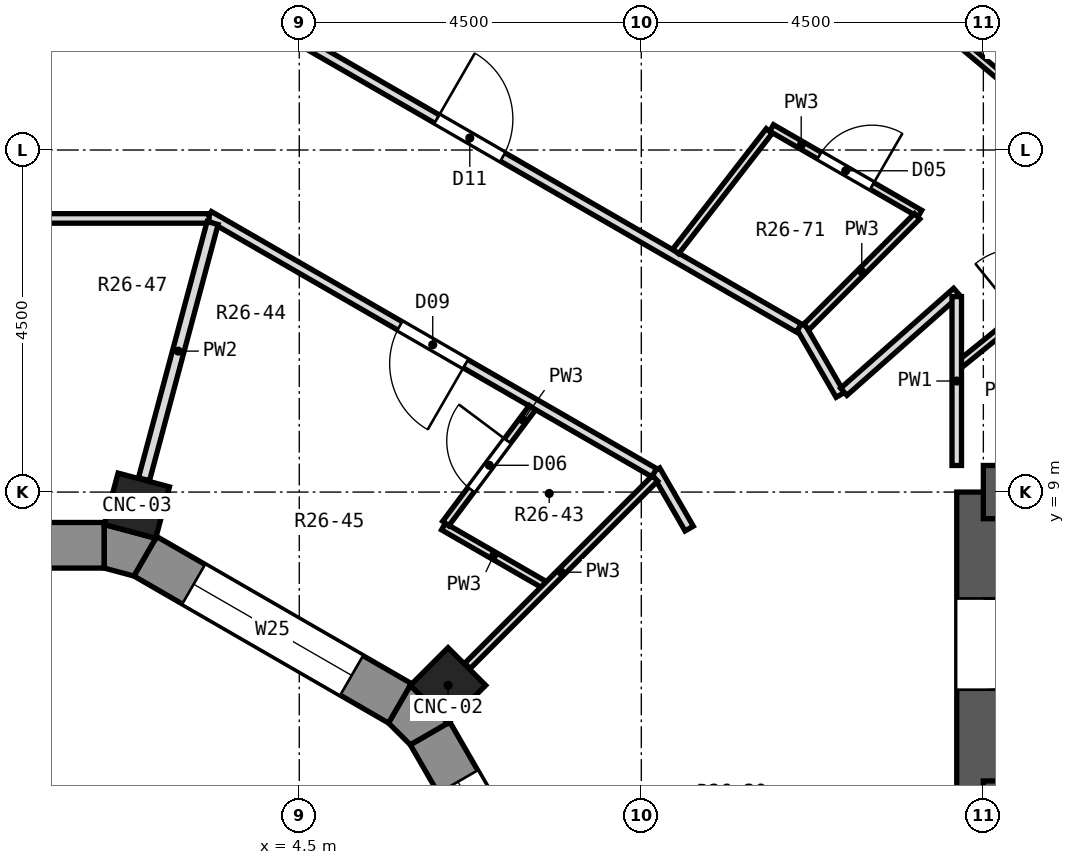
"""IFC4 building model, lengths in metres.
Left out: names, types, materials, properties, quantities, classifications, styles, units other than length and angle.
Written with IfcOpenShell. Run it as: python <this file> out.ifc"""

import sys

from ifc_helpers import new_model, si_unit, direction, frame, frame_2d, origin, origin_2d, place, context, subcontext, project, spatial, polyline, rectangle, outline, extrude, element, fill, save


model = new_model("IFC4")
c1 = context("Model", 3, precision=1e-05, world=origin(), true_north=direction((0.0, 1.0)))
c2 = subcontext(c1, "Body", "Model", "MODEL_VIEW")
j1 = project(units=[si_unit("LENGTHUNIT", "METRE"), si_unit("PLANEANGLEUNIT", "RADIAN")], contexts=[c1])
p1 = place(None, origin())
s1 = spatial("IfcSite", under=j1, at=p1, CompositionType="ELEMENT")
p2 = place(p1, origin())
s2 = spatial("IfcBuilding", under=s1, at=p2, CompositionType="ELEMENT")
p3 = place(p2, frame((0.0, 0.0, 170.7)))
s3 = spatial("IfcBuildingStorey", under=s2, at=p3, CompositionType="ELEMENT", Elevation=170.7)
for number, where, z_axis, x_axis in (
    (1, (6.458, 6.458, 0.0), (0.0, 0.0, 1.0), (0.707, 0.707, 0.0)),
    (2, (2.364, 8.821, 0.0), (0.0, 0.0, 1.0), (0.259, 0.966, 0.0)),
):
    element("IfcColumn", number, at=place(p3, frame(where, z_axis=z_axis, x_axis=x_axis)), inside=s3, PredefinedType="COLUMN", context=c2, shape_type="SweptSolid", body=[
        extrude(rectangle(XDim=0.7, YDim=0.7, at=origin_2d()), origin(), (0.0, 0.0, 1.0), 3.3),
    ])
p4 = place(p3, frame((13.5, -9.0, 0.0), z_axis=(0.0, 0.0, 1.0), x_axis=(0.0, 1.0, 0.0)))
e3 = element("IfcWall", 3, at=p4, inside=s3, PredefinedType="SHEAR", context=c2, shape_type="SweptSolid", body=[
    extrude(rectangle(XDim=18.0, YDim=0.7, at=frame_2d((9.0, 0.0))), origin(), (0.0, 0.0, 1.0), 3.3),
])
p5 = place(p4, frame((15.4, 0.0, 0.0)))
e4 = element("IfcOpeningElement", 4, at=p5, cuts=e3, PredefinedType="OPENING", context=c2, shape_type="SweptSolid", body=[
    extrude(rectangle(XDim=1.2, YDim=2.1, at=frame_2d((0.6, 1.05))), frame((0.0, 0.362, 0.0), z_axis=(0.0, -1.0, 0.0), x_axis=(1.0, 0.0, 0.0)), (0.0, 0.0, 1.0), 0.724),
])
p6 = place(p4, frame((1.4, 0.0, 0.0)))
e5 = element("IfcOpeningElement", 5, at=p6, cuts=e3, PredefinedType="OPENING", context=c2, shape_type="SweptSolid", body=[
    extrude(rectangle(XDim=1.2, YDim=2.1, at=frame_2d((0.6, 1.05))), frame((0.0, 0.362, 0.0), z_axis=(0.0, -1.0, 0.0), x_axis=(1.0, 0.0, 0.0)), (0.0, 0.0, 1.0), 0.724),
])
p7 = place(p4, frame((7.5, 0.0, 0.0)))
e6 = element("IfcOpeningElement", 6, at=p7, cuts=e3, PredefinedType="OPENING", context=c2, shape_type="SweptSolid", body=[
    extrude(rectangle(XDim=3.0, YDim=2.4, at=frame_2d((1.5, 1.2))), frame((0.0, 0.362, 0.0), z_axis=(0.0, -1.0, 0.0), x_axis=(1.0, 0.0, 0.0)), (0.0, 0.0, 1.0), 0.724),
])
p8 = place(p3, frame((13.5, 9.0, 0.0), z_axis=(0.0, 0.0, 1.0), x_axis=(1.0, 0.0, 0.0)))
e7 = element("IfcWall", 7, at=p8, inside=s3, PredefinedType="SHEAR", context=c2, shape_type="SweptSolid", body=[
    extrude(rectangle(XDim=8.0, YDim=0.7, at=frame_2d((4.0, 0.0))), origin(), (0.0, 0.0, 1.0), 3.3),
])
p9 = place(p3, frame((13.5, 5.0, 0.0), z_axis=(0.0, 0.0, 1.0), x_axis=(1.0, 0.0, 0.0)))
e8 = element("IfcWall", 8, at=p9, inside=s3, PredefinedType="SHEAR", context=c2, shape_type="SweptSolid", body=[
    extrude(rectangle(XDim=8.0, YDim=0.4, at=frame_2d((4.0, 0.0))), origin(), (0.0, 0.0, 1.0), 3.3),
])
p10 = place(p9, frame((6.285, 0.0, 0.0)))
e9 = element("IfcOpeningElement", 9, at=p10, cuts=e8, PredefinedType="OPENING", context=c2, shape_type="SweptSolid", body=[
    extrude(rectangle(XDim=0.9, YDim=2.1, at=frame_2d((0.45, 1.05))), frame((0.0, 0.212, 0.0), z_axis=(0.0, -1.0, 0.0), x_axis=(1.0, 0.0, 0.0)), (0.0, 0.0, 1.0), 0.424),
])
p11 = place(p3, frame((8.156, 2.474, 0.0), z_axis=(0.0, 0.0, 1.0), x_axis=(-0.500033728941, 0.866005929495, 0.0)))
e10 = element("IfcWall", 10, at=p11, inside=s3, PredefinedType="SOLIDWALL", context=c2, shape_type="SweptSolid", body=[
    extrude(rectangle(XDim=3.87, YDim=0.6, at=frame_2d((1.935, 0.0))), origin(), (0.0, 0.0, 1.0), 2.85),
])
p12 = place(p11, frame((0.735, 0.0, 0.9)))
e11 = element("IfcOpeningElement", 11, at=p12, cuts=e10, PredefinedType="OPENING", context=c2, shape_type="SweptSolid", body=[
    extrude(rectangle(XDim=2.4, YDim=1.8, at=frame_2d((1.2, 0.9))), frame((0.0, 0.312, 0.0), z_axis=(0.0, -1.0, 0.0), x_axis=(1.0, 0.0, 0.0)), (0.0, 0.0, 1.0), 0.624),
])
p13 = place(p3, frame((5.826, 6.22, 0.0), z_axis=(0.0, 0.0, 1.0), x_axis=(-0.866005929495, 0.500033728941, 0.0)))
e12 = element("IfcWall", 12, at=p13, inside=s3, PredefinedType="SOLIDWALL", context=c2, shape_type="SweptSolid", body=[
    extrude(rectangle(XDim=3.87, YDim=0.6, at=frame_2d((1.935, 0.0))), origin(), (0.0, 0.0, 1.0), 2.85),
])
p14 = place(p13, frame((0.735, 0.0, 0.9)))
e13 = element("IfcOpeningElement", 13, at=p14, cuts=e12, PredefinedType="OPENING", context=c2, shape_type="SweptSolid", body=[
    extrude(rectangle(XDim=2.4, YDim=1.8, at=frame_2d((1.2, 0.9))), frame((0.0, 0.312, 0.0), z_axis=(0.0, -1.0, 0.0), x_axis=(1.0, 0.0, 0.0)), (0.0, 0.0, 1.0), 0.624),
])
p15 = place(p3, frame((1.935, 8.3, 0.0), z_axis=(0.0, 0.0, 1.0), x_axis=(-1.0, 0.0, 0.0)))
e14 = element("IfcWall", 14, at=p15, inside=s3, PredefinedType="SOLIDWALL", context=c2, shape_type="SweptSolid", body=[
    extrude(rectangle(XDim=3.87, YDim=0.6, at=frame_2d((1.935, 0.0))), origin(), (0.0, 0.0, 1.0), 2.85),
])
p16 = place(p15, frame((0.735, 0.0, 0.9)))
e15 = element("IfcOpeningElement", 15, at=p16, cuts=e14, PredefinedType="OPENING", context=c2, shape_type="SweptSolid", body=[
    extrude(rectangle(XDim=2.4, YDim=1.8, at=frame_2d((1.2, 0.9))), frame((0.0, 0.312, 0.0), z_axis=(0.0, -1.0, 0.0), x_axis=(1.0, 0.0, 0.0)), (0.0, 0.0, 1.0), 0.624),
])
p17 = place(p3, origin())
e16 = element("IfcWall", 16, at=p17, inside=s3, PredefinedType="SOLIDWALL", context=c2, shape_type="SweptSolid", body=[
    extrude(outline(polyline([(5.962, 6.458), (5.676, 5.961), (5.961, 5.676), (6.458, 5.962), (5.962, 6.458)])), origin(), (0.0, 0.0, 1.0), 2.85),
])
p18 = place(p3, origin())
e17 = element("IfcWall", 17, at=p18, inside=s3, PredefinedType="SOLIDWALL", context=c2, shape_type="SweptSolid", body=[
    extrude(outline(polyline([(1.935, 8.573), (1.935, 8.0), (2.324, 7.896), (2.611, 8.392), (1.935, 8.573)])), origin(), (0.0, 0.0, 1.0), 2.85),
])
p19 = place(p3, frame((9.188, 9.287, 0.0), z_axis=(0.0, 0.0, 1.0), x_axis=(0.499403939877, -0.866369265865, 0.0)))
e18 = element("IfcWall", 18, at=p19, inside=s3, PredefinedType="PARTITIONING", context=c2, shape_type="SweptSolid", body=[
    extrude(rectangle(XDim=0.885, YDim=0.125, at=frame_2d((0.442, 0.0))), origin(), (0.0, 0.0, 1.0), 2.85),
])
p20 = place(p3, frame((11.091, 11.189, 0.0), z_axis=(0.0, 0.0, 1.0), x_axis=(0.499956751108, -0.866050372104, 0.0)))
e19 = element("IfcWall", 19, at=p20, inside=s3, PredefinedType="PARTITIONING", context=c2, shape_type="SweptSolid", body=[
    extrude(rectangle(XDim=1.052, YDim=0.125, at=frame_2d((0.526, 0.0))), origin(), (0.0, 0.0, 1.0), 2.85),
])
p21 = place(p3, frame((12.401, 15.578, 0.0), z_axis=(0.0, 0.0, 1.0), x_axis=(0.766209231034, -0.642591171958, 0.0)))
e20 = element("IfcWall", 20, at=p21, inside=s3, PredefinedType="PARTITIONING", context=c2, shape_type="SweptSolid", body=[
    extrude(rectangle(XDim=2.192, YDim=0.1, at=frame_2d((1.096, 0.0))), origin(), (0.0, 0.0, 1.0), 2.85),
])
p22 = place(p3, frame((6.397, 8.546, 0.0), z_axis=(0.0, 0.0, 1.0), x_axis=(0.866313615635, -0.499500469836, 0.0)))
e21 = element("IfcWall", 21, at=p22, inside=s3, PredefinedType="PARTITIONING", context=c2, shape_type="SweptSolid", body=[
    extrude(rectangle(XDim=1.523, YDim=0.1, at=frame_2d((0.762, 0.0))), origin(), (0.0, 0.0, 1.0), 2.85),
])
p23 = place(p3, frame((3.313, 12.636, 0.0), z_axis=(0.0, 0.0, 1.0), x_axis=(0.866048512801, -0.499959971872, 0.0)))
e22 = element("IfcWall", 22, at=p23, inside=s3, PredefinedType="PARTITIONING", context=c2, shape_type="SweptSolid", body=[
    extrude(rectangle(XDim=6.762, YDim=0.125, at=frame_2d((3.381, 0.0))), origin(), (0.0, 0.0, 1.0), 2.85),
])
p24 = place(p23, frame((2.898, 0.0, 0.0)))
e23 = element("IfcOpeningElement", 23, at=p24, cuts=e22, PredefinedType="OPENING", context=c2, shape_type="SweptSolid", body=[
    extrude(rectangle(XDim=1.0, YDim=2.1, at=frame_2d((0.5, 1.05))), frame((0.0, 0.074, 0.0), z_axis=(0.0, -1.0, 0.0), x_axis=(1.0, 0.0, 0.0)), (0.0, 0.0, 1.0), 0.149),
])
p25 = place(p3, frame((4.01, 15.236, 0.0), z_axis=(0.0, 0.0, 1.0), x_axis=(0.865999621737, -0.500044653157, 0.0)))
e24 = element("IfcWall", 24, at=p25, inside=s3, PredefinedType="PARTITIONING", context=c2, shape_type="SweptSolid", body=[
    extrude(rectangle(XDim=8.155, YDim=0.125, at=frame_2d((4.078, 0.0))), origin(), (0.0, 0.0, 1.0), 2.85),
])
p26 = place(p25, frame((2.656, 0.0, 0.0)))
e25 = element("IfcOpeningElement", 25, at=p26, cuts=e24, PredefinedType="OPENING", context=c2, shape_type="SweptSolid", body=[
    extrude(rectangle(XDim=1.0, YDim=2.1, at=frame_2d((0.5, 1.05))), frame((0.0, 0.074, 0.0), z_axis=(0.0, -1.0, 0.0), x_axis=(1.0, 0.0, 0.0)), (0.0, 0.0, 1.0), 0.149),
])
p27 = place(p3, frame((10.714, 13.79, 0.0), z_axis=(0.0, 0.0, 1.0), x_axis=(0.865992377614, -0.500057198642, 0.0)))
e26 = element("IfcWall", 26, at=p27, inside=s3, PredefinedType="PARTITIONING", context=c2, shape_type="SweptSolid", body=[
    extrude(rectangle(XDim=2.252, YDim=0.1, at=frame_2d((1.126, 0.0))), origin(), (0.0, 0.0, 1.0), 2.85),
])
p28 = place(p27, frame((0.726, 0.0, 0.0)))
e27 = element("IfcOpeningElement", 27, at=p28, cuts=e26, PredefinedType="OPENING", context=c2, shape_type="SweptSolid", body=[
    extrude(rectangle(XDim=0.8, YDim=2.1, at=frame_2d((0.4, 1.05))), frame((0.0, 0.062, 0.0), z_axis=(0.0, -1.0, 0.0), x_axis=(1.0, 0.0, 0.0)), (0.0, 0.0, 1.0), 0.124),
])
p29 = place(p3, frame((-3.463, 12.6, 0.0), z_axis=(0.0, 0.0, 1.0), x_axis=(1.0, 0.0, 0.0)))
e28 = element("IfcWall", 28, at=p29, inside=s3, PredefinedType="PARTITIONING", context=c2, shape_type="SweptSolid", body=[
    extrude(rectangle(XDim=6.776, YDim=0.125, at=frame_2d((3.388, 0.0))), origin(), (0.0, 0.0, 1.0), 2.85),
])
p30 = place(p29, frame((3.013, 0.0, 0.0)))
e29 = element("IfcOpeningElement", 29, at=p30, cuts=e28, PredefinedType="OPENING", context=c2, shape_type="SweptSolid", body=[
    extrude(rectangle(XDim=1.0, YDim=2.1, at=frame_2d((0.5, 1.05))), frame((0.0, 0.074, 0.0), z_axis=(0.0, -1.0, 0.0), x_axis=(1.0, 0.0, 0.0)), (0.0, 0.0, 1.0), 0.149),
])
p31 = place(p3, frame((13.198, 10.688, 0.0), z_axis=(0.0, 0.0, 1.0), x_axis=(0.777201155745, 0.629252225669, 0.0)))
e30 = element("IfcWall", 30, at=p31, inside=s3, PredefinedType="PARTITIONING", context=c2, shape_type="SweptSolid", body=[
    extrude(rectangle(XDim=2.861, YDim=0.1, at=frame_2d((1.431, 0.0))), origin(), (0.0, 0.0, 1.0), 2.85),
])
p32 = place(p31, frame((0.981, 0.0, 0.0)))
e31 = element("IfcOpeningElement", 31, at=p32, cuts=e30, PredefinedType="OPENING", context=c2, shape_type="SweptSolid", body=[
    extrude(rectangle(XDim=0.9, YDim=2.1, at=frame_2d((0.45, 1.05))), frame((0.0, 0.062, 0.0), z_axis=(0.0, -1.0, 0.0), x_axis=(1.0, 0.0, 0.0)), (0.0, 0.0, 1.0), 0.124),
])
p33 = place(p3, frame((11.664, 10.319, 0.0), z_axis=(0.0, 0.0, 1.0), x_axis=(0.748975424904, 0.662597776098, 0.0)))
e32 = element("IfcWall", 32, at=p33, inside=s3, PredefinedType="PARTITIONING", context=c2, shape_type="SweptSolid", body=[
    extrude(rectangle(XDim=1.984, YDim=0.125, at=frame_2d((0.992, 0.0))), origin(), (0.0, 0.0, 1.0), 2.85),
])
p34 = place(p3, frame((6.712, 6.712, 0.0), z_axis=(0.0, 0.0, 1.0), x_axis=(0.707106781187, 0.707106781187, 0.0)))
e33 = element("IfcWall", 33, at=p34, inside=s3, PredefinedType="PARTITIONING", context=c2, shape_type="SweptSolid", body=[
    extrude(rectangle(XDim=3.49, YDim=0.1, at=frame_2d((1.745, 0.0))), origin(), (0.0, 0.0, 1.0), 2.85),
])
p35 = place(p3, frame((11.171, 11.171, 0.0), z_axis=(0.0, 0.0, 1.0), x_axis=(0.707106781187, 0.707106781187, 0.0)))
e34 = element("IfcWall", 34, at=p35, inside=s3, PredefinedType="PARTITIONING", context=c2, shape_type="SweptSolid", body=[
    extrude(rectangle(XDim=2.061, YDim=0.1, at=frame_2d((1.031, 0.0))), origin(), (0.0, 0.0, 1.0), 2.85),
])
p36 = place(p3, frame((9.452, 12.166, 0.0), z_axis=(0.0, 0.0, 1.0), x_axis=(0.613384591442, 0.789784364863, 0.0)))
e35 = element("IfcWall", 35, at=p36, inside=s3, PredefinedType="PARTITIONING", context=c2, shape_type="SweptSolid", body=[
    extrude(rectangle(XDim=2.007, YDim=0.1, at=frame_2d((1.003, 0.0))), origin(), (0.0, 0.0, 1.0), 2.85),
])
p37 = place(p3, frame((6.427, 8.586, 0.0), z_axis=(0.0, 0.0, 1.0), x_axis=(0.599137140235, 0.800646418334, 0.0)))
e36 = element("IfcWall", 36, at=p37, inside=s3, PredefinedType="PARTITIONING", context=c2, shape_type="SweptSolid", body=[
    extrude(rectangle(XDim=1.902, YDim=0.1, at=frame_2d((0.951, 0.0))), origin(), (0.0, 0.0, 1.0), 2.85),
])
p38 = place(p37, frame((0.557, 0.0, 0.0)))
e37 = element("IfcOpeningElement", 37, at=p38, cuts=e36, PredefinedType="OPENING", context=c2, shape_type="SweptSolid", body=[
    extrude(rectangle(XDim=0.8, YDim=2.1, at=frame_2d((0.4, 1.05))), frame((0.0, 0.062, 0.0), z_axis=(0.0, -1.0, 0.0), x_axis=(1.0, 0.0, 0.0)), (0.0, 0.0, 1.0), 0.124),
])
p39 = place(p3, frame((2.457, 9.169, 0.0), z_axis=(0.0, 0.0, 1.0), x_axis=(0.258716268746, 0.96595335927, 0.0)))
e38 = element("IfcWall", 38, at=p39, inside=s3, PredefinedType="PARTITIONING", context=c2, shape_type="SweptSolid", body=[
    extrude(rectangle(XDim=3.49, YDim=0.15, at=frame_2d((1.745, 0.0))), origin(), (0.0, 0.0, 1.0), 2.85),
])
p40 = place(p3, frame((13.15, 9.35, 0.0), z_axis=(0.0, 0.0, 1.0), x_axis=(0.0, 1.0, 0.0)))
e39 = element("IfcWall", 39, at=p40, inside=s3, PredefinedType="PARTITIONING", context=c2, shape_type="SweptSolid", body=[
    extrude(rectangle(XDim=2.221, YDim=0.125, at=frame_2d((1.111, 0.0))), origin(), (0.0, 0.0, 1.0), 2.85),
])
p41 = place(p12, origin())
e40 = element("IfcWindow", 40, at=p41, inside=s3, PartitioningType="SINGLE_PANEL", PredefinedType="WINDOW", context=c2, shape_type="SweptSolid", body=[
    extrude(rectangle(XDim=2.4, YDim=1.8, at=frame_2d((1.2, 0.9))), frame((0.0, -0.12, 0.0), z_axis=(0.0, -1.0, 0.0), x_axis=(1.0, 0.0, 0.0)), (0.0, 0.0, 1.0), 0.06),
])
fill(e11, e40)
p42 = place(p14, origin())
e41 = element("IfcWindow", 41, at=p42, inside=s3, PartitioningType="SINGLE_PANEL", PredefinedType="WINDOW", context=c2, shape_type="SweptSolid", body=[
    extrude(rectangle(XDim=2.4, YDim=1.8, at=frame_2d((1.2, 0.9))), frame((0.0, -0.12, 0.0), z_axis=(0.0, -1.0, 0.0), x_axis=(1.0, 0.0, 0.0)), (0.0, 0.0, 1.0), 0.06),
])
fill(e13, e41)
p43 = place(p28, origin())
e42 = element("IfcDoor", 42, at=p43, inside=s3, OperationType="SINGLE_SWING_RIGHT", PredefinedType="DOOR", context=c2, shape_type="SweptSolid", body=[
    extrude(rectangle(XDim=0.8, YDim=2.1, at=frame_2d((0.4, 1.05))), frame((0.0, 0.025, 0.0), z_axis=(0.0, -1.0, 0.0), x_axis=(1.0, 0.0, 0.0)), (0.0, 0.0, 1.0), 0.05),
])
fill(e27, e42)
p44 = place(p38, origin())
e43 = element("IfcDoor", 43, at=p44, inside=s3, OperationType="SINGLE_SWING_RIGHT", PredefinedType="DOOR", context=c2, shape_type="SweptSolid", body=[
    extrude(rectangle(XDim=0.8, YDim=2.1, at=frame_2d((0.4, 1.05))), frame((0.0, 0.025, 0.0), z_axis=(0.0, -1.0, 0.0), x_axis=(1.0, 0.0, 0.0)), (0.0, 0.0, 1.0), 0.05),
])
fill(e37, e43)
p45 = place(p24, frame((1.0, 0.0, 0.0), z_axis=(0.0, 0.0, 1.0), x_axis=(-1.0, 0.0, 0.0)))
e44 = element("IfcDoor", 44, at=p45, inside=s3, OperationType="SINGLE_SWING_LEFT", PredefinedType="DOOR", context=c2, shape_type="SweptSolid", body=[
    extrude(rectangle(XDim=1.0, YDim=2.1, at=frame_2d((0.5, 1.05))), frame((0.0, 0.025, 0.0), z_axis=(0.0, -1.0, 0.0), x_axis=(1.0, 0.0, 0.0)), (0.0, 0.0, 1.0), 0.05),
])
fill(e23, e44)
p46 = place(p26, origin())
e45 = element("IfcDoor", 45, at=p46, inside=s3, OperationType="SINGLE_SWING_LEFT", PredefinedType="DOOR", context=c2, shape_type="SweptSolid", body=[
    extrude(rectangle(XDim=1.0, YDim=2.1, at=frame_2d((0.5, 1.05))), frame((0.0, 0.025, 0.0), z_axis=(0.0, -1.0, 0.0), x_axis=(1.0, 0.0, 0.0)), (0.0, 0.0, 1.0), 0.05),
])
fill(e25, e45)
p47 = place(p5, frame((1.2, 0.0, 0.0), z_axis=(0.0, 0.0, 1.0), x_axis=(-1.0, 0.0, 0.0)))
e46 = element("IfcDoor", 46, at=p47, inside=s3, OperationType="SINGLE_SWING_LEFT", PredefinedType="DOOR", context=c2, shape_type="SweptSolid", body=[
    extrude(rectangle(XDim=1.2, YDim=2.1, at=frame_2d((0.6, 1.05))), frame((0.0, 0.025, 0.0), z_axis=(0.0, -1.0, 0.0), x_axis=(1.0, 0.0, 0.0)), (0.0, 0.0, 1.0), 0.05),
])
fill(e4, e46)
save(model, sys.argv[1])
